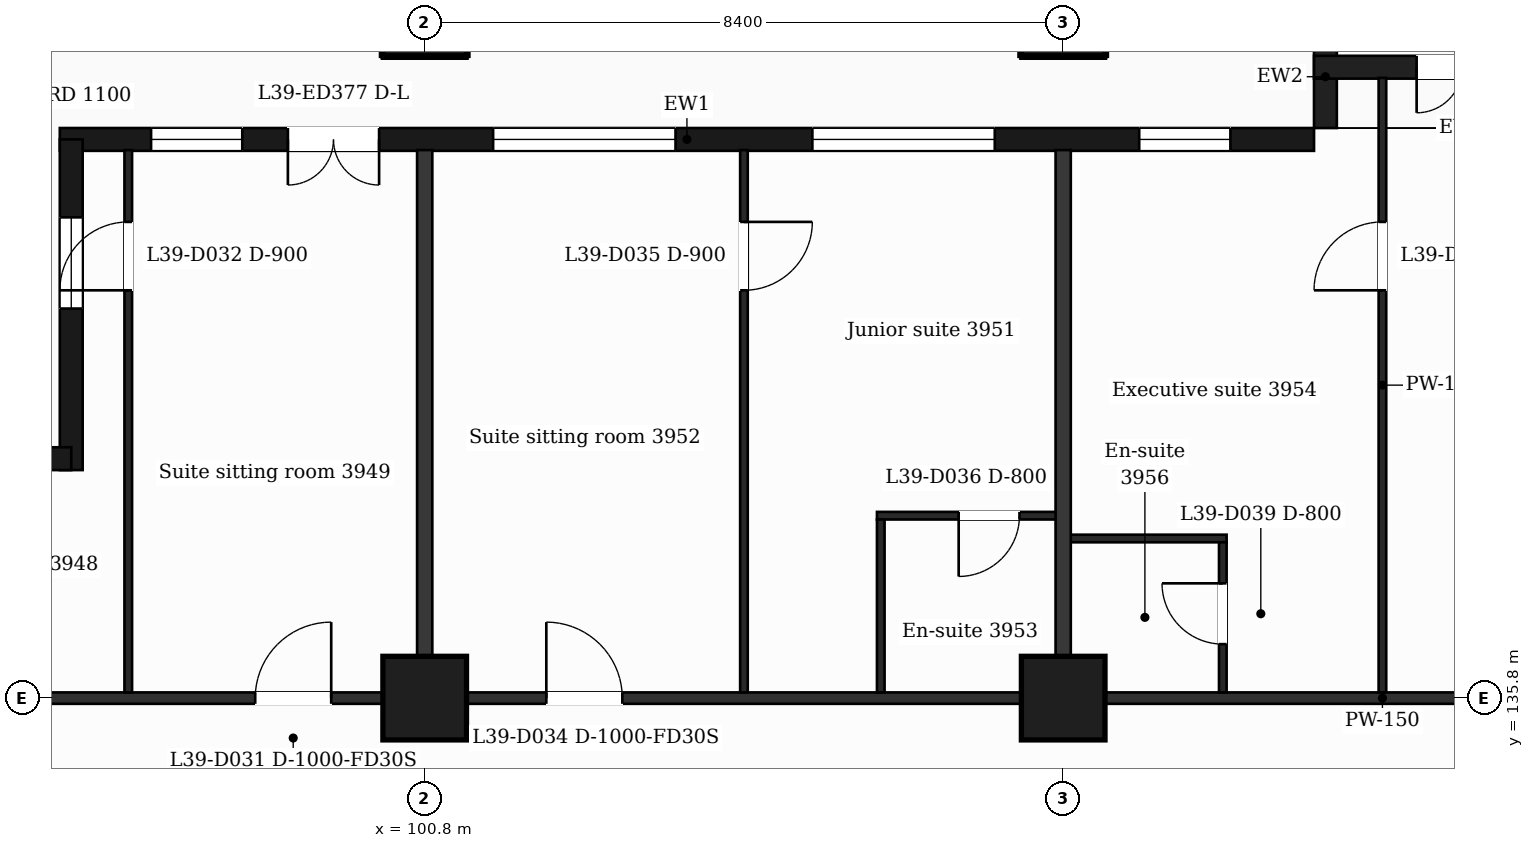
"""IFC4 building model, lengths in metres.
Left out: names, types, materials, properties, quantities, classifications, styles, units other than length and angle.
Written with IfcOpenShell. Run it as: python <this file> out.ifc"""

import sys

from ifc_helpers import new_model, si_unit, direction, frame, frame_2d, origin, origin_2d, place, context, subcontext, project, spatial, rectangle, extrude, element, fill, save


model = new_model("IFC4")
c1 = context("Model", 3, precision=1e-05, world=origin(), true_north=direction((0.0, 1.0)))
c2 = subcontext(c1, "Body", "Model", "MODEL_VIEW")
j1 = project(units=[si_unit("LENGTHUNIT", "METRE"), si_unit("PLANEANGLEUNIT", "RADIAN")], contexts=[c1])
p1 = place(None, origin())
s1 = spatial("IfcSite", under=j1, at=p1, CompositionType="ELEMENT")
p2 = place(p1, origin())
s2 = spatial("IfcBuilding", under=s1, at=p2, CompositionType="ELEMENT")
p3 = place(p2, frame((0.0, 0.0, 166.3)))
s3 = spatial("IfcBuildingStorey", under=s2, at=p3, CompositionType="ELEMENT", Elevation=166.3)
for number, where, z_axis, x_axis in (
    (1, (100.8, 135.8, 0.0), (0.0, 0.0, 1.0), (1.0, 0.0, 0.0)),
    (2, (109.2, 135.8, 0.0), (0.0, 0.0, 1.0), (1.0, 0.0, 0.0)),
    (3, (100.8, 144.8, 0.0), (0.0, 0.0, 1.0), (1.0, 0.0, 0.0)),
    (4, (109.2, 144.8, 0.0), (0.0, 0.0, 1.0), (1.0, 0.0, 0.0)),
):
    element("IfcColumn", number, at=place(p3, frame(where, z_axis=z_axis, x_axis=x_axis)), inside=s3, PredefinedType="COLUMN", context=c2, shape_type="SweptSolid", body=[
        extrude(rectangle(XDim=1.1, YDim=1.1, at=origin_2d()), origin(), (0.0, 0.0, 1.0), 3.7),
    ])
p4 = place(p3, frame((112.5, 143.15, 0.0), z_axis=(0.0, 0.0, 1.0), x_axis=(-1.0, 0.0, 0.0)))
e5 = element("IfcWall", 5, at=p4, inside=s3, PredefinedType="SOLIDWALL", context=c2, shape_type="SweptSolid", body=[
    extrude(rectangle(XDim=16.5, YDim=0.3, at=frame_2d((8.25, 0.0))), origin(), (0.0, 0.0, 1.0), 3.38),
])
p5 = place(p4, frame((1.1, 0.0, 0.9)))
e6 = element("IfcOpeningElement", 6, at=p5, cuts=e5, PredefinedType="OPENING", context=c2, shape_type="SweptSolid", body=[
    extrude(rectangle(XDim=1.2, YDim=2.1, at=frame_2d((0.6, 1.05))), frame((0.0, 0.16, 0.0), z_axis=(0.0, -1.0, 0.0), x_axis=(1.0, 0.0, 0.0)), (0.0, 0.0, 1.0), 0.32),
])
p6 = place(p4, frame((4.2, 0.0, 0.9)))
e7 = element("IfcOpeningElement", 7, at=p6, cuts=e5, PredefinedType="OPENING", context=c2, shape_type="SweptSolid", body=[
    extrude(rectangle(XDim=2.4, YDim=2.1, at=frame_2d((1.2, 1.05))), frame((0.0, 0.16, 0.0), z_axis=(0.0, -1.0, 0.0), x_axis=(1.0, 0.0, 0.0)), (0.0, 0.0, 1.0), 0.32),
])
p7 = place(p4, frame((8.4, 0.0, 0.9)))
e8 = element("IfcOpeningElement", 8, at=p7, cuts=e5, PredefinedType="OPENING", context=c2, shape_type="SweptSolid", body=[
    extrude(rectangle(XDim=2.4, YDim=2.1, at=frame_2d((1.2, 1.05))), frame((0.0, 0.16, 0.0), z_axis=(0.0, -1.0, 0.0), x_axis=(1.0, 0.0, 0.0)), (0.0, 0.0, 1.0), 0.32),
])
p8 = place(p4, frame((12.3, 0.0, 0.0)))
e9 = element("IfcOpeningElement", 9, at=p8, cuts=e5, PredefinedType="OPENING", context=c2, shape_type="SweptSolid", body=[
    extrude(rectangle(XDim=1.2, YDim=2.4, at=frame_2d((0.6, 1.2))), frame((0.0, 0.16, 0.0), z_axis=(0.0, -1.0, 0.0), x_axis=(1.0, 0.0, 0.0)), (0.0, 0.0, 1.0), 0.32),
])
p9 = place(p4, frame((14.1, 0.0, 0.9)))
e10 = element("IfcOpeningElement", 10, at=p9, cuts=e5, PredefinedType="OPENING", context=c2, shape_type="SweptSolid", body=[
    extrude(rectangle(XDim=1.2, YDim=2.1, at=frame_2d((0.6, 1.05))), frame((0.0, 0.16, 0.0), z_axis=(0.0, -1.0, 0.0), x_axis=(1.0, 0.0, 0.0)), (0.0, 0.0, 1.0), 0.32),
])
p10 = place(p3, frame((112.65, 143.3, 0.0), z_axis=(0.0, 0.0, 1.0), x_axis=(0.0, 1.0, 0.0)))
e11 = element("IfcWall", 11, at=p10, inside=s3, PredefinedType="SOLIDWALL", context=c2, shape_type="SweptSolid", body=[
    extrude(rectangle(XDim=1.35, YDim=0.3, at=frame_2d((0.675, 0.0))), origin(), (0.0, 0.0, 1.0), 3.38),
])
p11 = place(p3, frame((116.4, 144.1, 0.0), z_axis=(0.0, 0.0, 1.0), x_axis=(-1.0, 0.0, 0.0)))
e12 = element("IfcWall", 12, at=p11, inside=s3, PredefinedType="SOLIDWALL", context=c2, shape_type="SweptSolid", body=[
    extrude(rectangle(XDim=3.9, YDim=0.3, at=frame_2d((1.95, 0.0))), origin(), (0.0, 0.0, 1.0), 3.38),
])
p12 = place(p11, frame((1.35, 0.0, 0.0)))
e13 = element("IfcOpeningElement", 13, at=p12, cuts=e12, PredefinedType="OPENING", context=c2, shape_type="SweptSolid", body=[
    extrude(rectangle(XDim=1.2, YDim=2.4, at=frame_2d((0.6, 1.2))), frame((0.0, 0.16, 0.0), z_axis=(0.0, -1.0, 0.0), x_axis=(1.0, 0.0, 0.0)), (0.0, 0.0, 1.0), 0.32),
])
p13 = place(p3, frame((96.15, 143.15, 0.0), z_axis=(0.0, 0.0, 1.0), x_axis=(0.0, -1.0, 0.0)))
e14 = element("IfcWall", 14, at=p13, inside=s3, PredefinedType="SOLIDWALL", context=c2, shape_type="SweptSolid", body=[
    extrude(rectangle(XDim=4.35, YDim=0.3, at=frame_2d((2.175, 0.0))), origin(), (0.0, 0.0, 1.0), 3.38),
])
p14 = place(p13, frame((1.025, 0.0, 0.9)))
e15 = element("IfcOpeningElement", 15, at=p14, cuts=e14, PredefinedType="OPENING", context=c2, shape_type="SweptSolid", body=[
    extrude(rectangle(XDim=1.2, YDim=2.1, at=frame_2d((0.6, 1.05))), frame((0.0, 0.16, 0.0), z_axis=(0.0, -1.0, 0.0), x_axis=(1.0, 0.0, 0.0)), (0.0, 0.0, 1.0), 0.32),
])
p15 = place(p3, frame((96.15, 138.95, 0.0), z_axis=(0.0, 0.0, 1.0), x_axis=(-1.0, 0.0, 0.0)))
e16 = element("IfcWall", 16, at=p15, inside=s3, PredefinedType="SOLIDWALL", context=c2, shape_type="SweptSolid", body=[
    extrude(rectangle(XDim=5.104, YDim=0.3, at=frame_2d((2.552, 0.0))), origin(), (0.0, 0.0, 1.0), 3.38),
])
p16 = place(p15, frame((0.725, 0.0, 0.9)))
e17 = element("IfcOpeningElement", 17, at=p16, cuts=e16, PredefinedType="OPENING", context=c2, shape_type="SweptSolid", body=[
    extrude(rectangle(XDim=2.4, YDim=2.1, at=frame_2d((1.2, 1.05))), frame((0.0, 0.16, 0.0), z_axis=(0.0, -1.0, 0.0), x_axis=(1.0, 0.0, 0.0)), (0.0, 0.0, 1.0), 0.32),
])
p17 = place(p3, frame((90.895, 135.8, 0.0), z_axis=(0.0, 0.0, 1.0), x_axis=(1.0, 0.0, 0.0)))
e18 = element("IfcWall", 18, at=p17, inside=s3, PredefinedType="PARTITIONING", context=c2, shape_type="SweptSolid", body=[
    extrude(rectangle(XDim=45.011, YDim=0.15, at=frame_2d((22.505, 0.0))), origin(), (0.0, 0.0, 1.0), 3.38),
])
p18 = place(p17, frame((7.675, 0.0, 0.0)))
e19 = element("IfcOpeningElement", 19, at=p18, cuts=e18, PredefinedType="OPENING", context=c2, shape_type="SweptSolid", body=[
    extrude(rectangle(XDim=1.0, YDim=2.1, at=frame_2d((0.5, 1.05))), frame((0.0, 0.085, 0.0), z_axis=(0.0, -1.0, 0.0), x_axis=(1.0, 0.0, 0.0)), (0.0, 0.0, 1.0), 0.17),
])
p19 = place(p17, frame((11.505, 0.0, 0.0)))
e20 = element("IfcOpeningElement", 20, at=p19, cuts=e18, PredefinedType="OPENING", context=c2, shape_type="SweptSolid", body=[
    extrude(rectangle(XDim=1.0, YDim=2.1, at=frame_2d((0.5, 1.05))), frame((0.0, 0.085, 0.0), z_axis=(0.0, -1.0, 0.0), x_axis=(1.0, 0.0, 0.0)), (0.0, 0.0, 1.0), 0.17),
])
p20 = place(p17, frame((24.865, 0.0, 0.0)))
e21 = element("IfcOpeningElement", 21, at=p20, cuts=e18, PredefinedType="OPENING", context=c2, shape_type="SweptSolid", body=[
    extrude(rectangle(XDim=1.0, YDim=2.1, at=frame_2d((0.5, 1.05))), frame((0.0, 0.085, 0.0), z_axis=(0.0, -1.0, 0.0), x_axis=(1.0, 0.0, 0.0)), (0.0, 0.0, 1.0), 0.17),
])
p21 = place(p17, frame((31.18, 0.0, 0.0)))
e22 = element("IfcOpeningElement", 22, at=p21, cuts=e18, PredefinedType="OPENING", context=c2, shape_type="SweptSolid", body=[
    extrude(rectangle(XDim=0.95, YDim=2.1, at=frame_2d((0.475, 1.05))), frame((0.0, 0.085, 0.0), z_axis=(0.0, -1.0, 0.0), x_axis=(1.0, 0.0, 0.0)), (0.0, 0.0, 1.0), 0.17),
])
p22 = place(p17, frame((36.335, 0.0, 0.0)))
e23 = element("IfcOpeningElement", 23, at=p22, cuts=e18, PredefinedType="OPENING", context=c2, shape_type="SweptSolid", body=[
    extrude(rectangle(XDim=1.0, YDim=2.1, at=frame_2d((0.5, 1.05))), frame((0.0, 0.085, 0.0), z_axis=(0.0, -1.0, 0.0), x_axis=(1.0, 0.0, 0.0)), (0.0, 0.0, 1.0), 0.17),
])
p23 = place(p3, frame((109.2, 137.9, 0.0), z_axis=(0.0, 0.0, 1.0), x_axis=(1.0, 0.0, 0.0)))
e24 = element("IfcWall", 24, at=p23, inside=s3, PredefinedType="PARTITIONING", context=c2, shape_type="SweptSolid", body=[
    extrude(rectangle(XDim=2.15, YDim=0.1, at=frame_2d((1.075, 0.0))), origin(), (0.0, 0.0, 1.0), 3.38),
])
p24 = place(p3, frame((106.75, 138.2, 0.0), z_axis=(0.0, 0.0, 1.0), x_axis=(1.0, 0.0, 0.0)))
e25 = element("IfcWall", 25, at=p24, inside=s3, PredefinedType="PARTITIONING", context=c2, shape_type="SweptSolid", body=[
    extrude(rectangle(XDim=2.45, YDim=0.1, at=frame_2d((1.225, 0.0))), origin(), (0.0, 0.0, 1.0), 3.38),
])
p25 = place(p24, frame((1.075, 0.0, 0.0)))
e26 = element("IfcOpeningElement", 26, at=p25, cuts=e25, PredefinedType="OPENING", context=c2, shape_type="SweptSolid", body=[
    extrude(rectangle(XDim=0.8, YDim=2.1, at=frame_2d((0.4, 1.05))), frame((0.0, 0.06, 0.0), z_axis=(0.0, -1.0, 0.0), x_axis=(1.0, 0.0, 0.0)), (0.0, 0.0, 1.0), 0.12),
])
p26 = place(p3, frame((96.9, 135.875, 0.0), z_axis=(0.0, 0.0, 1.0), x_axis=(0.0, 1.0, 0.0)))
e27 = element("IfcWall", 27, at=p26, inside=s3, PredefinedType="PARTITIONING", context=c2, shape_type="SweptSolid", body=[
    extrude(rectangle(XDim=7.135, YDim=0.1, at=frame_2d((3.567, 0.0))), origin(), (0.0, 0.0, 1.0), 3.38),
])
p27 = place(p26, frame((5.29, 0.0, 0.0)))
e28 = element("IfcOpeningElement", 28, at=p27, cuts=e27, PredefinedType="OPENING", context=c2, shape_type="SweptSolid", body=[
    extrude(rectangle(XDim=0.9, YDim=2.1, at=frame_2d((0.45, 1.05))), frame((0.0, 0.06, 0.0), z_axis=(0.0, -1.0, 0.0), x_axis=(1.0, 0.0, 0.0)), (0.0, 0.0, 1.0), 0.12),
])
p28 = place(p3, frame((100.8, 135.875, 0.0), z_axis=(0.0, 0.0, 1.0), x_axis=(0.0, 1.0, 0.0)))
e29 = element("IfcWall", 29, at=p28, inside=s3, PredefinedType="PARTITIONING", context=c2, shape_type="SweptSolid", body=[
    extrude(rectangle(XDim=7.135, YDim=0.2, at=frame_2d((3.567, 0.0))), origin(), (0.0, 0.0, 1.0), 3.38),
])
p29 = place(p3, frame((105.0, 135.875, 0.0), z_axis=(0.0, 0.0, 1.0), x_axis=(0.0, 1.0, 0.0)))
e30 = element("IfcWall", 30, at=p29, inside=s3, PredefinedType="PARTITIONING", context=c2, shape_type="SweptSolid", body=[
    extrude(rectangle(XDim=7.135, YDim=0.1, at=frame_2d((3.567, 0.0))), origin(), (0.0, 0.0, 1.0), 3.38),
])
p30 = place(p29, frame((5.29, 0.0, 0.0)))
e31 = element("IfcOpeningElement", 31, at=p30, cuts=e30, PredefinedType="OPENING", context=c2, shape_type="SweptSolid", body=[
    extrude(rectangle(XDim=0.9, YDim=2.1, at=frame_2d((0.45, 1.05))), frame((0.0, 0.06, 0.0), z_axis=(0.0, -1.0, 0.0), x_axis=(1.0, 0.0, 0.0)), (0.0, 0.0, 1.0), 0.12),
])
p31 = place(p3, frame((106.8, 135.875, 0.0), z_axis=(0.0, 0.0, 1.0), x_axis=(0.0, 1.0, 0.0)))
e32 = element("IfcWall", 32, at=p31, inside=s3, PredefinedType="PARTITIONING", context=c2, shape_type="SweptSolid", body=[
    extrude(rectangle(XDim=2.275, YDim=0.1, at=frame_2d((1.137, 0.0))), origin(), (0.0, 0.0, 1.0), 3.38),
])
p32 = place(p3, frame((109.2, 135.875, 0.0), z_axis=(0.0, 0.0, 1.0), x_axis=(0.0, 1.0, 0.0)))
e33 = element("IfcWall", 33, at=p32, inside=s3, PredefinedType="PARTITIONING", context=c2, shape_type="SweptSolid", body=[
    extrude(rectangle(XDim=7.135, YDim=0.2, at=frame_2d((3.567, 0.0))), origin(), (0.0, 0.0, 1.0), 3.38),
])
p33 = place(p3, frame((111.3, 135.875, 0.0), z_axis=(0.0, 0.0, 1.0), x_axis=(0.0, 1.0, 0.0)))
e34 = element("IfcWall", 34, at=p33, inside=s3, PredefinedType="PARTITIONING", context=c2, shape_type="SweptSolid", body=[
    extrude(rectangle(XDim=1.975, YDim=0.1, at=frame_2d((0.988, 0.0))), origin(), (0.0, 0.0, 1.0), 3.38),
])
p34 = place(p33, frame((0.635, 0.0, 0.0)))
e35 = element("IfcOpeningElement", 35, at=p34, cuts=e34, PredefinedType="OPENING", context=c2, shape_type="SweptSolid", body=[
    extrude(rectangle(XDim=0.8, YDim=2.1, at=frame_2d((0.4, 1.05))), frame((0.0, 0.06, 0.0), z_axis=(0.0, -1.0, 0.0), x_axis=(1.0, 0.0, 0.0)), (0.0, 0.0, 1.0), 0.12),
])
p35 = place(p3, frame((113.4, 135.875, 0.0), z_axis=(0.0, 0.0, 1.0), x_axis=(0.0, 1.0, 0.0)))
e36 = element("IfcWall", 36, at=p35, inside=s3, PredefinedType="PARTITIONING", context=c2, shape_type="SweptSolid", body=[
    extrude(rectangle(XDim=8.085, YDim=0.1, at=frame_2d((4.042, 0.0))), origin(), (0.0, 0.0, 1.0), 3.38),
])
p36 = place(p35, frame((5.29, 0.0, 0.0)))
e37 = element("IfcOpeningElement", 37, at=p36, cuts=e36, PredefinedType="OPENING", context=c2, shape_type="SweptSolid", body=[
    extrude(rectangle(XDim=0.9, YDim=2.1, at=frame_2d((0.45, 1.05))), frame((0.0, 0.06, 0.0), z_axis=(0.0, -1.0, 0.0), x_axis=(1.0, 0.0, 0.0)), (0.0, 0.0, 1.0), 0.12),
])
p37 = place(p5, origin())
e38 = element("IfcWindow", 38, at=p37, inside=s3, PartitioningType="SINGLE_PANEL", PredefinedType="WINDOW", context=c2, shape_type="SweptSolid", body=[
    extrude(rectangle(XDim=1.2, YDim=2.1, at=frame_2d((0.6, 1.05))), frame((0.0, 0.03, 0.0), z_axis=(0.0, -1.0, 0.0), x_axis=(1.0, 0.0, 0.0)), (0.0, 0.0, 1.0), 0.06),
])
fill(e6, e38)
p38 = place(p6, origin())
e39 = element("IfcWindow", 39, at=p38, inside=s3, PartitioningType="SINGLE_PANEL", PredefinedType="WINDOW", context=c2, shape_type="SweptSolid", body=[
    extrude(rectangle(XDim=2.4, YDim=2.1, at=frame_2d((1.2, 1.05))), frame((0.0, 0.03, 0.0), z_axis=(0.0, -1.0, 0.0), x_axis=(1.0, 0.0, 0.0)), (0.0, 0.0, 1.0), 0.06),
])
fill(e7, e39)
p39 = place(p7, origin())
e40 = element("IfcWindow", 40, at=p39, inside=s3, PartitioningType="SINGLE_PANEL", PredefinedType="WINDOW", context=c2, shape_type="SweptSolid", body=[
    extrude(rectangle(XDim=2.4, YDim=2.1, at=frame_2d((1.2, 1.05))), frame((0.0, 0.03, 0.0), z_axis=(0.0, -1.0, 0.0), x_axis=(1.0, 0.0, 0.0)), (0.0, 0.0, 1.0), 0.06),
])
fill(e8, e40)
p40 = place(p8, origin())
e41 = element("IfcDoor", 41, at=p40, inside=s3, OperationType="DOUBLE_DOOR_SINGLE_SWING", PredefinedType="DOOR", context=c2, shape_type="SweptSolid", body=[
    extrude(rectangle(XDim=1.2, YDim=2.4, at=frame_2d((0.6, 1.2))), frame((0.0, 0.025, 0.0), z_axis=(0.0, -1.0, 0.0), x_axis=(1.0, 0.0, 0.0)), (0.0, 0.0, 1.0), 0.05),
])
fill(e9, e41)
p41 = place(p9, origin())
e42 = element("IfcWindow", 42, at=p41, inside=s3, PartitioningType="SINGLE_PANEL", PredefinedType="WINDOW", context=c2, shape_type="SweptSolid", body=[
    extrude(rectangle(XDim=1.2, YDim=2.1, at=frame_2d((0.6, 1.05))), frame((0.0, 0.03, 0.0), z_axis=(0.0, -1.0, 0.0), x_axis=(1.0, 0.0, 0.0)), (0.0, 0.0, 1.0), 0.06),
])
fill(e10, e42)
p42 = place(p12, origin())
e43 = element("IfcDoor", 43, at=p42, inside=s3, OperationType="DOUBLE_DOOR_SINGLE_SWING", PredefinedType="DOOR", context=c2, shape_type="SweptSolid", body=[
    extrude(rectangle(XDim=1.2, YDim=2.4, at=frame_2d((0.6, 1.2))), frame((0.0, 0.025, 0.0), z_axis=(0.0, -1.0, 0.0), x_axis=(1.0, 0.0, 0.0)), (0.0, 0.0, 1.0), 0.05),
])
fill(e13, e43)
p43 = place(p14, origin())
e44 = element("IfcWindow", 44, at=p43, inside=s3, PartitioningType="SINGLE_PANEL", PredefinedType="WINDOW", context=c2, shape_type="SweptSolid", body=[
    extrude(rectangle(XDim=1.2, YDim=2.1, at=frame_2d((0.6, 1.05))), frame((0.0, 0.03, 0.0), z_axis=(0.0, -1.0, 0.0), x_axis=(1.0, 0.0, 0.0)), (0.0, 0.0, 1.0), 0.06),
])
fill(e15, e44)
p44 = place(p18, origin())
e45 = element("IfcDoor", 45, at=p44, inside=s3, OperationType="SINGLE_SWING_RIGHT", PredefinedType="DOOR", context=c2, shape_type="SweptSolid", body=[
    extrude(rectangle(XDim=1.0, YDim=2.1, at=frame_2d((0.5, 1.05))), frame((0.0, 0.025, 0.0), z_axis=(0.0, -1.0, 0.0), x_axis=(1.0, 0.0, 0.0)), (0.0, 0.0, 1.0), 0.05),
])
fill(e19, e45)
p45 = place(p27, origin())
e46 = element("IfcDoor", 46, at=p45, inside=s3, OperationType="SINGLE_SWING_LEFT", PredefinedType="DOOR", context=c2, shape_type="SweptSolid", body=[
    extrude(rectangle(XDim=0.9, YDim=2.1, at=frame_2d((0.45, 1.05))), frame((0.0, 0.025, 0.0), z_axis=(0.0, -1.0, 0.0), x_axis=(1.0, 0.0, 0.0)), (0.0, 0.0, 1.0), 0.05),
])
fill(e28, e46)
p46 = place(p19, origin())
e47 = element("IfcDoor", 47, at=p46, inside=s3, OperationType="SINGLE_SWING_LEFT", PredefinedType="DOOR", context=c2, shape_type="SweptSolid", body=[
    extrude(rectangle(XDim=1.0, YDim=2.1, at=frame_2d((0.5, 1.05))), frame((0.0, 0.025, 0.0), z_axis=(0.0, -1.0, 0.0), x_axis=(1.0, 0.0, 0.0)), (0.0, 0.0, 1.0), 0.05),
])
fill(e20, e47)
p47 = place(p30, origin())
e48 = element("IfcDoor", 48, at=p47, inside=s3, OperationType="SINGLE_SWING_RIGHT", PredefinedType="DOOR", context=c2, shape_type="SweptSolid", body=[
    extrude(rectangle(XDim=0.9, YDim=2.1, at=frame_2d((0.45, 1.05))), frame((0.0, 0.025, 0.0), z_axis=(0.0, -1.0, 0.0), x_axis=(1.0, 0.0, 0.0)), (0.0, 0.0, 1.0), 0.05),
])
fill(e31, e48)
p48 = place(p25, origin())
e49 = element("IfcDoor", 49, at=p48, inside=s3, OperationType="SINGLE_SWING_LEFT", PredefinedType="DOOR", context=c2, shape_type="SweptSolid", body=[
    extrude(rectangle(XDim=0.8, YDim=2.1, at=frame_2d((0.4, 1.05))), frame((0.0, 0.025, 0.0), z_axis=(0.0, -1.0, 0.0), x_axis=(1.0, 0.0, 0.0)), (0.0, 0.0, 1.0), 0.05),
])
fill(e26, e49)
p49 = place(p36, origin())
e50 = element("IfcDoor", 50, at=p49, inside=s3, OperationType="SINGLE_SWING_LEFT", PredefinedType="DOOR", context=c2, shape_type="SweptSolid", body=[
    extrude(rectangle(XDim=0.9, YDim=2.1, at=frame_2d((0.45, 1.05))), frame((0.0, 0.025, 0.0), z_axis=(0.0, -1.0, 0.0), x_axis=(1.0, 0.0, 0.0)), (0.0, 0.0, 1.0), 0.05),
])
fill(e37, e50)
p50 = place(p34, origin())
e51 = element("IfcDoor", 51, at=p50, inside=s3, OperationType="SINGLE_SWING_RIGHT", PredefinedType="DOOR", context=c2, shape_type="SweptSolid", body=[
    extrude(rectangle(XDim=0.8, YDim=2.1, at=frame_2d((0.4, 1.05))), frame((0.0, 0.025, 0.0), z_axis=(0.0, -1.0, 0.0), x_axis=(1.0, 0.0, 0.0)), (0.0, 0.0, 1.0), 0.05),
])
fill(e35, e51)
save(model, sys.argv[1])
